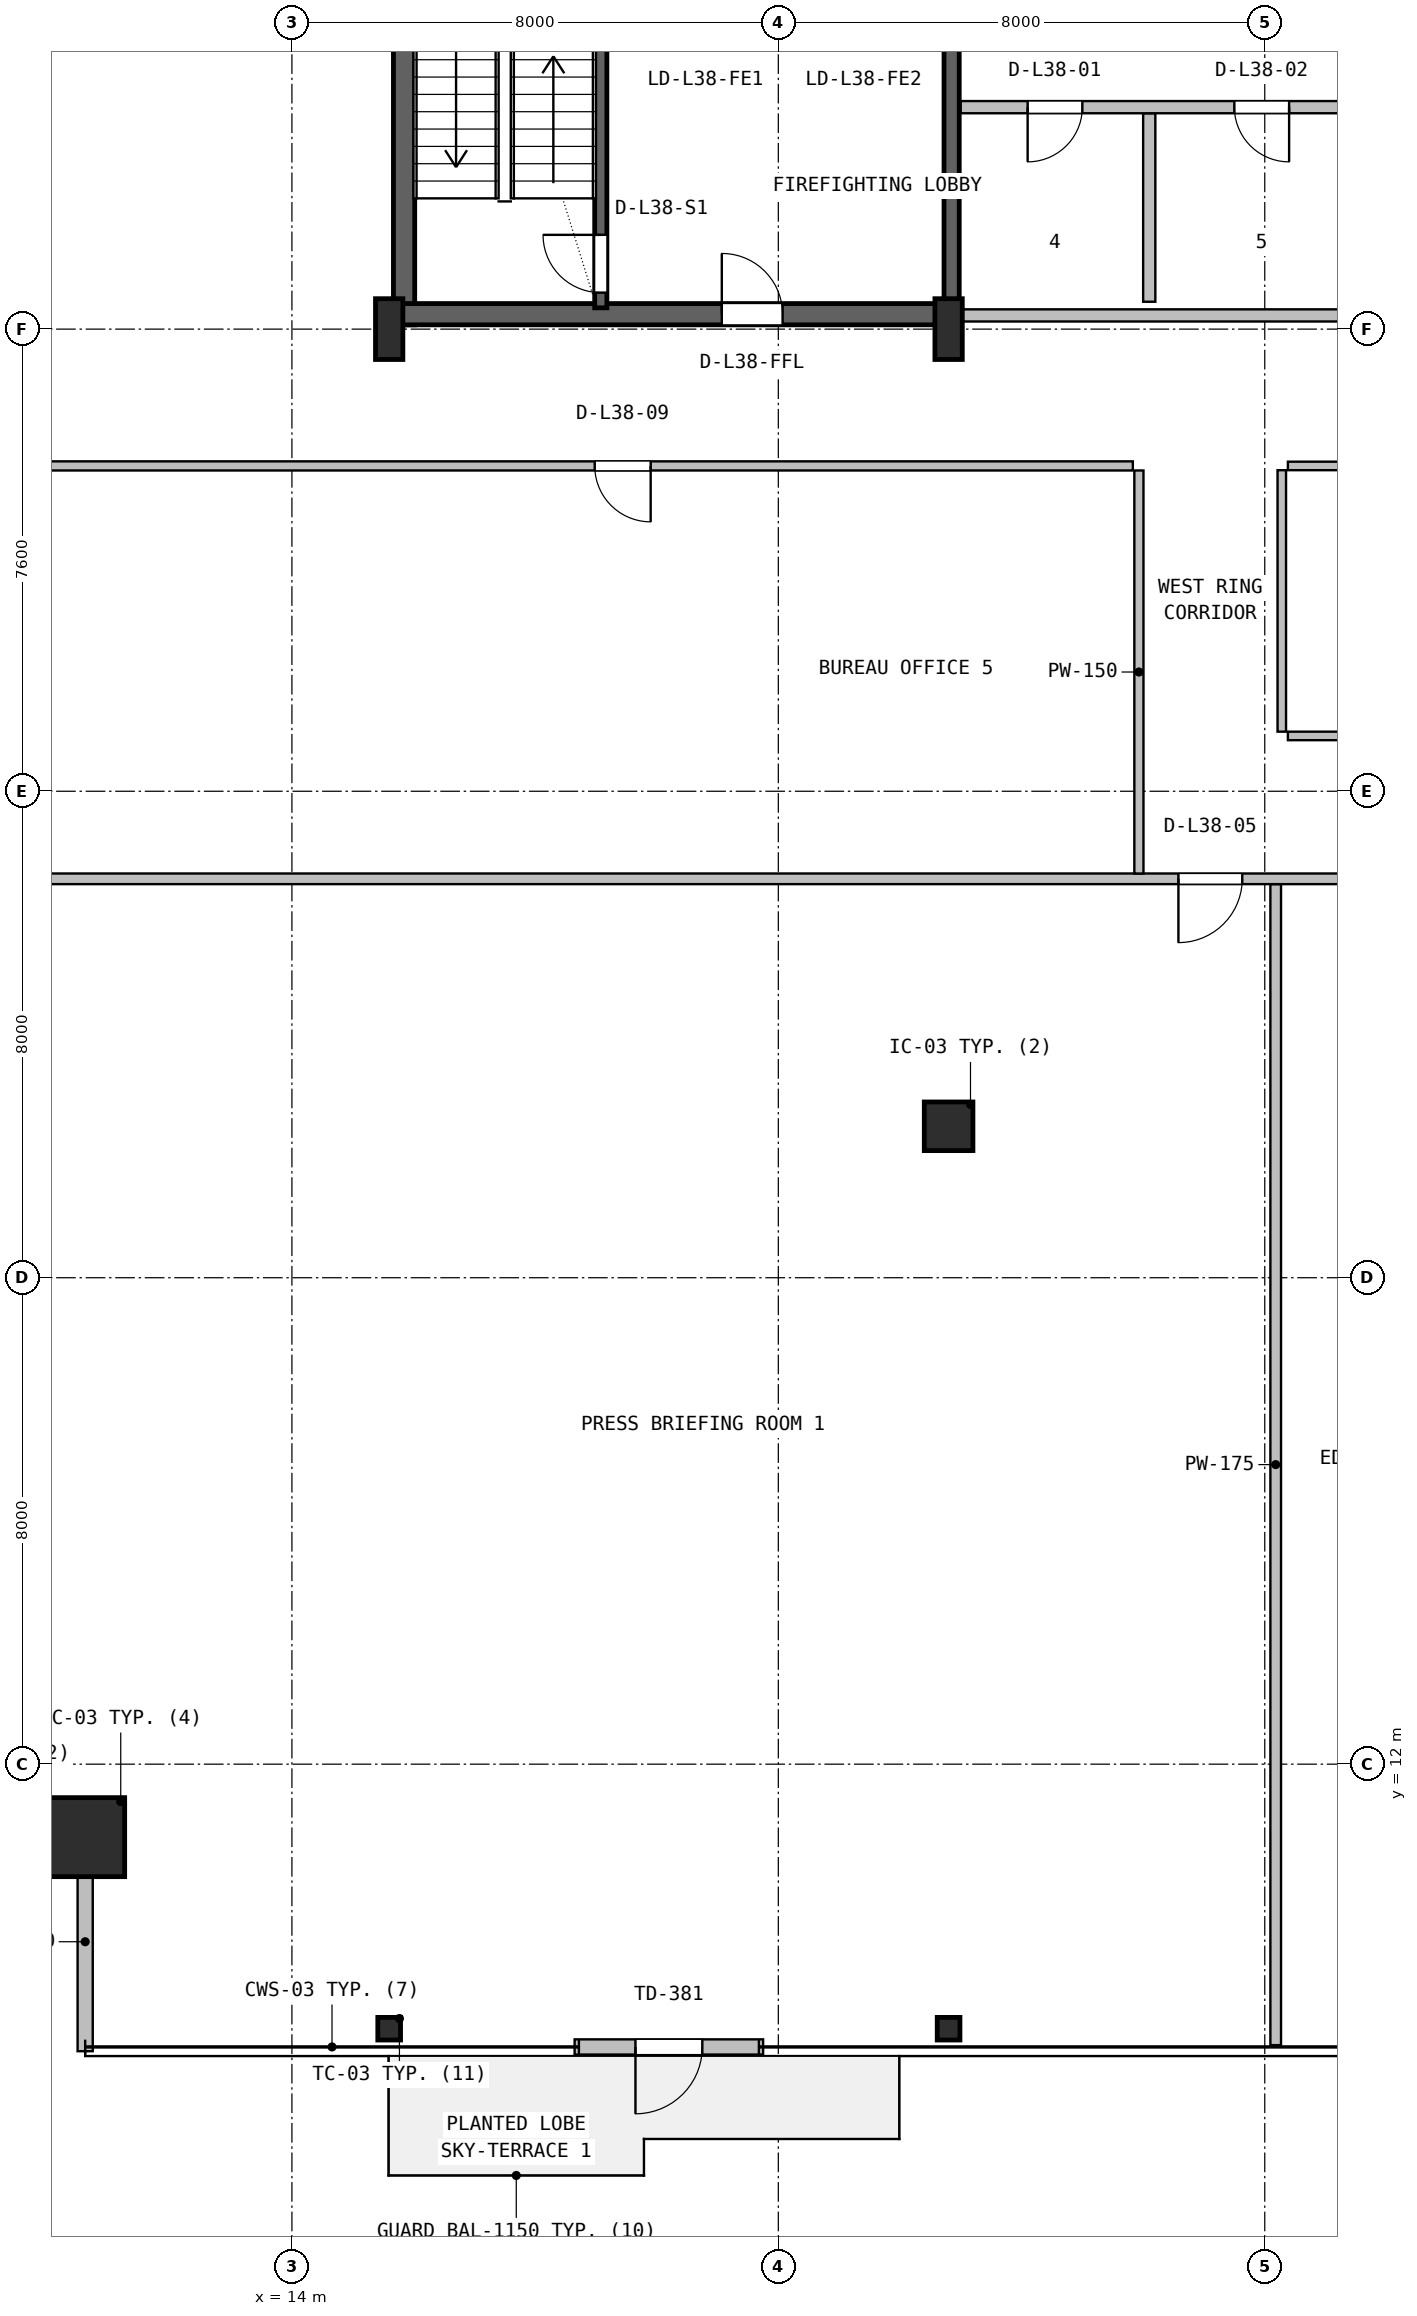
"""IFC4 building model, lengths in metres.
Left out: names, types, materials, properties, quantities, classifications, styles, units other than length and angle.
Written with IfcOpenShell. Run it as: python <this file> out.ifc"""

import sys

from ifc_helpers import new_model, si_unit, direction, frame, frame_2d, origin, origin_2d, place, context, subcontext, project, spatial, rectangle, hollow_rectangle, i_section, extrude, source, transform, mapped, element, fill, save


model = new_model("IFC4")
c1 = context("Model", 3, precision=1e-05, world=origin(), true_north=direction((0.0, 1.0)))
c2 = subcontext(c1, "Body", "Model", "MODEL_VIEW")
j1 = project(units=[si_unit("LENGTHUNIT", "METRE"), si_unit("PLANEANGLEUNIT", "RADIAN")], contexts=[c1])
p1 = place(None, origin())
s1 = spatial("IfcSite", under=j1, at=p1, CompositionType="ELEMENT")
p2 = place(p1, origin())
s2 = spatial("IfcBuilding", under=s1, at=p2, CompositionType="ELEMENT")
p3 = place(p2, frame((0.0, 0.0, 157.2)))
s3 = spatial("IfcBuildingStorey", under=s2, at=p3, CompositionType="ELEMENT", Elevation=157.2)
p4 = place(p3, frame((15.845, 35.67, 0.0), z_axis=(0.0, 0.0, 1.0), x_axis=(0.0, 1.0, 0.0)))
e1 = element("IfcWall", 1, at=p4, inside=s3, PredefinedType="SHEAR", context=c2, shape_type="SweptSolid", body=[
    extrude(rectangle(XDim=11.13, YDim=0.35, at=frame_2d((5.565, 0.0))), origin(), (0.0, 0.0, 1.0), 3.55),
])
p5 = place(p3, frame((15.67, 35.845, 0.0), z_axis=(0.0, 0.0, 1.0), x_axis=(1.0, 0.0, 0.0)))
e2 = element("IfcWall", 2, at=p5, inside=s3, PredefinedType="SHEAR", context=c2, shape_type="SweptSolid", body=[
    extrude(rectangle(XDim=9.13, YDim=0.35, at=frame_2d((4.565, 0.0))), origin(), (0.0, 0.0, 1.0), 3.55),
])
p6 = place(p5, frame((5.4, 0.0, 0.0)))
e3 = element("IfcOpeningElement", 3, at=p6, cuts=e2, PredefinedType="OPENING", context=c2, shape_type="SweptSolid", body=[
    extrude(rectangle(XDim=1.0, YDim=2.1, at=frame_2d((0.5, 1.05))), frame((0.0, 0.185, 0.0), z_axis=(0.0, -1.0, 0.0), x_axis=(1.0, 0.0, 0.0)), (0.0, 0.0, 1.0), 0.37),
])
m1 = source(origin(), c2, "Body", "SweptSolid", [
    extrude(i_section(OverallWidth=0.45, OverallDepth=1.0, WebThickness=0.016, FlangeThickness=0.03, FilletRadius=0.016, at=origin_2d()), origin(), (0.0, 0.0, 1.0), 3.8),
])
for number, where, z_axis, x_axis in (
    (4, (15.6, 35.6, 0.0), (0.0, 0.0, 1.0), (1.0, 0.0, 0.0)),
    (5, (24.8, 35.6, 0.0), (0.0, 0.0, 1.0), (1.0, 0.0, 0.0)),
):
    element("IfcColumn", number, at=place(p3, frame(where, z_axis=z_axis, x_axis=x_axis)), inside=s3, PredefinedType="COLUMN", context=c2, shape_type="MappedRepresentation", body=[
        mapped(m1, transform((0.0, 0.0, 0.0), x_axis=(1.0, 0.0, 0.0), y_axis=(0.0, 1.0, 0.0), z_axis=(0.0, 0.0, 1.0), scale=1.0)),
    ])
m2 = source(origin(), c2, "Body", "SweptSolid", [
    extrude(hollow_rectangle(XDim=1.3, YDim=1.3, WallThickness=0.05, at=origin_2d()), origin(), (0.0, 0.0, 1.0), 3.8),
])
p7 = place(p3, frame((10.6, 10.8, 0.0), z_axis=(0.0, 0.0, 1.0), x_axis=(1.0, 0.0, 0.0)))
e6 = element("IfcColumn", 6, at=p7, inside=s3, PredefinedType="COLUMN", context=c2, shape_type="MappedRepresentation", body=[
    mapped(m2, transform((0.0, 0.0, 0.0), x_axis=(1.0, 0.0, 0.0), y_axis=(0.0, 1.0, 0.0), z_axis=(0.0, 0.0, 1.0), scale=1.0)),
])
m3 = source(origin(), c2, "Body", "SweptSolid", [
    extrude(i_section(OverallWidth=0.374, OverallDepth=0.372, WebThickness=0.016, FlangeThickness=0.026, FilletRadius=0.016, at=origin_2d()), origin(), (0.0, 0.0, 1.0), 3.8),
])
for number, where, z_axis, x_axis in (
    (7, (15.6, 7.65, 0.0), (0.0, 0.0, 1.0), (1.0, 0.0, 0.0)),
    (8, (24.8, 7.65, 0.0), (0.0, 0.0, 1.0), (1.0, 0.0, 0.0)),
):
    element("IfcColumn", number, at=place(p3, frame(where, z_axis=z_axis, x_axis=x_axis)), inside=s3, PredefinedType="COLUMN", context=c2, shape_type="MappedRepresentation", body=[
        mapped(m3, transform((0.0, 0.0, 0.0), x_axis=(1.0, 0.0, 0.0), y_axis=(0.0, 1.0, 0.0), z_axis=(0.0, 0.0, 1.0), scale=1.0)),
    ])
m4 = source(origin(), c2, "Body", "SweptSolid", [
    extrude(rectangle(XDim=0.8, YDim=0.8, at=origin_2d()), origin(), (0.0, 0.0, 1.0), 3.8),
])
p8 = place(p3, frame((24.8, 22.49, 0.0), z_axis=(0.0, 0.0, 1.0), x_axis=(1.0, 0.0, 0.0)))
e9 = element("IfcColumn", 9, at=p8, inside=s3, PredefinedType="COLUMN", context=c2, shape_type="MappedRepresentation", body=[
    mapped(m4, transform((0.0, 0.0, 0.0), x_axis=(1.0, 0.0, 0.0), y_axis=(0.0, 1.0, 0.0), z_axis=(0.0, 0.0, 1.0), scale=1.0)),
])
p9 = place(p3, frame((18.65, 7.35, 0.0), z_axis=(0.0, 0.0, 1.0), x_axis=(1.0, 0.0, 0.0)))
e10 = element("IfcWall", 10, at=p9, inside=s3, PredefinedType="SOLIDWALL", context=c2, shape_type="SweptSolid", body=[
    extrude(rectangle(XDim=3.1, YDim=0.25, at=frame_2d((1.55, 0.0))), origin(), (0.0, 0.0, 1.0), 3.53),
])
p10 = place(p9, frame((1.0, 0.0, 0.0)))
e11 = element("IfcOpeningElement", 11, at=p10, cuts=e10, PredefinedType="OPENING", context=c2, shape_type="SweptSolid", body=[
    extrude(rectangle(XDim=1.1, YDim=2.15, at=frame_2d((0.55, 1.075))), frame((0.0, 0.135, 0.0), z_axis=(0.0, -1.0, 0.0), x_axis=(1.0, 0.0, 0.0)), (0.0, 0.0, 1.0), 0.27),
])
p11 = place(p3, frame((10.6, 7.28, 0.0), z_axis=(0.0, 0.0, 1.0), x_axis=(0.0, 1.0, 0.0)))
e12 = element("IfcWall", 12, at=p11, inside=s3, PredefinedType="SOLIDWALL", context=c2, shape_type="SweptSolid", body=[
    extrude(rectangle(XDim=3.6, YDim=0.25, at=frame_2d((1.8, 0.0))), origin(), (0.0, 0.0, 1.0), 3.108),
])
p12 = place(p3, frame((19.08, 35.95, 0.0), z_axis=(0.0, 0.0, 1.0), x_axis=(0.0, 1.0, 0.0)))
e13 = element("IfcWall", 13, at=p12, inside=s3, PredefinedType="SHEAR", context=c2, shape_type="SweptSolid", body=[
    extrude(rectangle(XDim=9.65, YDim=0.2, at=frame_2d((4.825, 0.0))), origin(), (0.0, 0.0, 1.0), 3.55),
])
p13 = place(p12, frame((0.25, 0.0, 0.0)))
e14 = element("IfcOpeningElement", 14, at=p13, cuts=e13, PredefinedType="OPENING", context=c2, shape_type="SweptSolid", body=[
    extrude(rectangle(XDim=0.95, YDim=2.1, at=frame_2d((0.475, 1.05))), frame((0.0, 0.11, 0.0), z_axis=(0.0, -1.0, 0.0), x_axis=(1.0, 0.0, 0.0)), (0.0, 0.0, 1.0), 0.22),
])
p14 = place(p3, frame((24.85, 36.05, 0.0), z_axis=(0.0, 0.0, 1.0), x_axis=(0.0, 1.0, 0.0)))
e15 = element("IfcWall", 15, at=p14, inside=s3, PredefinedType="SHEAR", context=c2, shape_type="SweptSolid", body=[
    extrude(rectangle(XDim=10.45, YDim=0.25, at=frame_2d((5.225, 0.0))), origin(), (0.0, 0.0, 1.0), 3.55),
])
p15 = place(p3, frame((25.0, 35.825, 0.0), z_axis=(0.0, 0.0, 1.0), x_axis=(1.0, 0.0, 0.0)))
e16 = element("IfcWall", 16, at=p15, inside=s3, PredefinedType="SOLIDWALL", context=c2, shape_type="SweptSolid", body=[
    extrude(rectangle(XDim=12.95, YDim=0.2, at=frame_2d((6.475, 0.0))), origin(), (0.0, 0.0, 1.0), 2.575),
])
p16 = place(p3, frame((28.1, 36.05, 0.0), z_axis=(0.0, 0.0, 1.0), x_axis=(0.0, 1.0, 0.0)))
e17 = element("IfcWall", 17, at=p16, inside=s3, PredefinedType="PLUMBINGWALL", context=c2, shape_type="SweptSolid", body=[
    extrude(rectangle(XDim=3.1, YDim=0.2, at=frame_2d((1.55, 0.0))), origin(), (0.0, 0.0, 1.0), 3.53),
])
p17 = place(p3, frame((25.0, 39.25, 0.0), z_axis=(0.0, 0.0, 1.0), x_axis=(1.0, 0.0, 0.0)))
e18 = element("IfcWall", 18, at=p17, inside=s3, PredefinedType="SOLIDWALL", context=c2, shape_type="SweptSolid", body=[
    extrude(rectangle(XDim=12.95, YDim=0.2, at=frame_2d((6.475, 0.0))), origin(), (0.0, 0.0, 1.0), 3.53),
])
p18 = place(p17, frame((1.1, 0.0, 0.0)))
e19 = element("IfcOpeningElement", 19, at=p18, cuts=e18, PredefinedType="OPENING", context=c2, shape_type="SweptSolid", body=[
    extrude(rectangle(XDim=0.9, YDim=2.06, at=frame_2d((0.45, 1.03))), frame((0.0, 0.11, 0.0), z_axis=(0.0, -1.0, 0.0), x_axis=(1.0, 0.0, 0.0)), (0.0, 0.0, 1.0), 0.22),
])
p19 = place(p17, frame((4.5, 0.0, 0.0)))
e20 = element("IfcOpeningElement", 20, at=p19, cuts=e18, PredefinedType="OPENING", context=c2, shape_type="SweptSolid", body=[
    extrude(rectangle(XDim=0.9, YDim=2.06, at=frame_2d((0.45, 1.03))), frame((0.0, 0.11, 0.0), z_axis=(0.0, -1.0, 0.0), x_axis=(1.0, 0.0, 0.0)), (0.0, 0.0, 1.0), 0.22),
])
p20 = place(p17, frame((7.84, 0.0, 0.0)))
e21 = element("IfcOpeningElement", 21, at=p20, cuts=e18, PredefinedType="OPENING", context=c2, shape_type="SweptSolid", body=[
    extrude(rectangle(XDim=0.92, YDim=2.08, at=frame_2d((0.46, 1.04))), frame((0.0, 0.11, 0.0), z_axis=(0.0, -1.0, 0.0), x_axis=(1.0, 0.0, 0.0)), (0.0, 0.0, 1.0), 0.22),
])
p21 = place(p17, frame((10.875, 0.0, 0.0)))
e22 = element("IfcOpeningElement", 22, at=p21, cuts=e18, PredefinedType="OPENING", context=c2, shape_type="SweptSolid", body=[
    extrude(rectangle(XDim=1.2, YDim=2.1, at=frame_2d((0.6, 1.05))), frame((0.0, 0.11, 0.0), z_axis=(0.0, -1.0, 0.0), x_axis=(1.0, 0.0, 0.0)), (0.0, 0.0, 1.0), 0.22),
])
p22 = place(p3, frame((30.18, 7.38, 0.0), z_axis=(0.0, 0.0, 1.0), x_axis=(0.0, 1.0, 0.0)))
e23 = element("IfcWall", 23, at=p22, inside=s3, PredefinedType="PARTITIONING", context=c2, shape_type="SweptSolid", body=[
    extrude(rectangle(XDim=19.093, YDim=0.175, at=frame_2d((9.546, 0.0))), origin(), (0.0, 0.0, 1.0), 2.909),
])
p23 = place(p3, frame((7.18, 26.56, 0.0), z_axis=(0.0, 0.0, 1.0), x_axis=(1.0, 0.0, 0.0)))
e24 = element("IfcWall", 24, at=p23, inside=s3, PredefinedType="PARTITIONING", context=c2, shape_type="SweptSolid", body=[
    extrude(rectangle(XDim=53.64, YDim=0.175, at=frame_2d((26.82, 0.0))), origin(), (0.0, 0.0, 1.0), 2.909),
])
p24 = place(p23, frame((21.4, 0.0, 0.0)))
e25 = element("IfcOpeningElement", 25, at=p24, cuts=e24, PredefinedType="OPENING", context=c2, shape_type="SweptSolid", body=[
    extrude(rectangle(XDim=1.05, YDim=2.1, at=frame_2d((0.525, 1.05))), frame((0.0, 0.098, 0.0), z_axis=(0.0, -1.0, 0.0), x_axis=(1.0, 0.0, 0.0)), (0.0, 0.0, 1.0), 0.195),
])
p25 = place(p23, frame((25.205, 0.0, 0.0)))
e26 = element("IfcOpeningElement", 26, at=p25, cuts=e24, PredefinedType="OPENING", context=c2, shape_type="SweptSolid", body=[
    extrude(rectangle(XDim=1.05, YDim=2.1, at=frame_2d((0.525, 1.05))), frame((0.0, 0.098, 0.0), z_axis=(0.0, -1.0, 0.0), x_axis=(1.0, 0.0, 0.0)), (0.0, 0.0, 1.0), 0.195),
])
p26 = place(p23, frame((29.825, 0.0, 0.0)))
e27 = element("IfcOpeningElement", 27, at=p26, cuts=e24, PredefinedType="OPENING", context=c2, shape_type="SweptSolid", body=[
    extrude(rectangle(XDim=1.4, YDim=2.12, at=frame_2d((0.7, 1.06))), frame((0.0, 0.098, 0.0), z_axis=(0.0, -1.0, 0.0), x_axis=(1.0, 0.0, 0.0)), (0.0, 0.0, 1.0), 0.195),
])
p27 = place(p23, frame((33.425, 0.0, 0.0)))
e28 = element("IfcOpeningElement", 28, at=p27, cuts=e24, PredefinedType="OPENING", context=c2, shape_type="SweptSolid", body=[
    extrude(rectangle(XDim=0.88, YDim=2.06, at=frame_2d((0.44, 1.03))), frame((0.0, 0.098, 0.0), z_axis=(0.0, -1.0, 0.0), x_axis=(1.0, 0.0, 0.0)), (0.0, 0.0, 1.0), 0.195),
])
p28 = place(p3, frame((27.93, 26.647, 0.0), z_axis=(0.0, 0.0, 1.0), x_axis=(0.0, 1.0, 0.0)))
e29 = element("IfcWall", 29, at=p28, inside=s3, PredefinedType="PARTITIONING", context=c2, shape_type="SweptSolid", body=[
    extrude(rectangle(XDim=6.628, YDim=0.15, at=frame_2d((3.314, 0.0))), origin(), (0.0, 0.0, 1.0), 3.222),
])
p29 = place(p3, frame((7.18, 33.35, 0.0), z_axis=(0.0, 0.0, 1.0), x_axis=(1.0, 0.0, 0.0)))
e30 = element("IfcWall", 30, at=p29, inside=s3, PredefinedType="PARTITIONING", context=c2, shape_type="SweptSolid", body=[
    extrude(rectangle(XDim=20.65, YDim=0.15, at=frame_2d((10.325, 0.0))), origin(), (0.0, 0.0, 1.0), 2.909),
])
p30 = place(p29, frame((11.8, 0.0, 0.0)))
e31 = element("IfcOpeningElement", 31, at=p30, cuts=e30, PredefinedType="OPENING", context=c2, shape_type="SweptSolid", body=[
    extrude(rectangle(XDim=0.92, YDim=2.08, at=frame_2d((0.46, 1.04))), frame((0.0, 0.085, 0.0), z_axis=(0.0, -1.0, 0.0), x_axis=(1.0, 0.0, 0.0)), (0.0, 0.0, 1.0), 0.17),
])
p31 = place(p3, frame((30.38, 28.91, 0.0), z_axis=(0.0, 0.0, 1.0), x_axis=(1.0, 0.0, 0.0)))
e32 = element("IfcWall", 32, at=p31, inside=s3, PredefinedType="PARTITIONING", context=c2, shape_type="SweptSolid", body=[
    extrude(rectangle(XDim=9.39, YDim=0.14, at=frame_2d((4.695, 0.0))), origin(), (0.0, 0.0, 1.0), 2.909),
])
p32 = place(p31, frame((2.03, 0.0, 0.0)))
e33 = element("IfcOpeningElement", 33, at=p32, cuts=e32, PredefinedType="OPENING", context=c2, shape_type="SweptSolid", body=[
    extrude(rectangle(XDim=1.0, YDim=2.1, at=frame_2d((0.5, 1.05))), frame((0.0, 0.08, 0.0), z_axis=(0.0, -1.0, 0.0), x_axis=(1.0, 0.0, 0.0)), (0.0, 0.0, 1.0), 0.16),
])
p33 = place(p3, frame((30.38, 33.35, 0.0), z_axis=(0.0, 0.0, 1.0), x_axis=(1.0, 0.0, 0.0)))
e34 = element("IfcWall", 34, at=p33, inside=s3, PredefinedType="PARTITIONING", context=c2, shape_type="SweptSolid", body=[
    extrude(rectangle(XDim=9.39, YDim=0.14, at=frame_2d((4.695, 0.0))), origin(), (0.0, 0.0, 1.0), 2.909),
])
p34 = place(p3, frame((30.28, 28.98, 0.0), z_axis=(0.0, 0.0, 1.0), x_axis=(0.0, 1.0, 0.0)))
e35 = element("IfcWall", 35, at=p34, inside=s3, PredefinedType="PARTITIONING", context=c2, shape_type="SweptSolid", body=[
    extrude(rectangle(XDim=4.3, YDim=0.14, at=frame_2d((2.15, 0.0))), origin(), (0.0, 0.0, 1.0), 3.222),
])
m5 = source(origin(), c2, "Body", "SweptSolid", [
    extrude(rectangle(XDim=1.1, YDim=2.15, at=frame_2d((0.55, 1.075))), frame((0.0, 0.025, 0.0), z_axis=(0.0, -1.0, 0.0), x_axis=(1.0, 0.0, 0.0)), (0.0, 0.0, 1.0), 0.05),
])
p35 = place(p10, frame((1.1, 0.0, 0.0), z_axis=(0.0, 0.0, 1.0), x_axis=(-1.0, 0.0, 0.0)))
e36 = element("IfcDoor", 36, at=p35, inside=s3, OperationType="SINGLE_SWING_LEFT", PredefinedType="DOOR", context=c2, shape_type="MappedRepresentation", body=[
    mapped(m5, transform((0.0, 0.0, 0.0), x_axis=(1.0, 0.0, 0.0), y_axis=(0.0, 1.0, 0.0), z_axis=(0.0, 0.0, 1.0), scale=1.0)),
])
fill(e11, e36)
m6 = source(origin(), c2, "Body", "SweptSolid", [
    extrude(rectangle(XDim=0.95, YDim=2.1, at=frame_2d((0.475, 1.05))), frame((0.0, 0.025, 0.0), z_axis=(0.0, -1.0, 0.0), x_axis=(1.0, 0.0, 0.0)), (0.0, 0.0, 1.0), 0.05),
])
p36 = place(p13, origin())
e37 = element("IfcDoor", 37, at=p36, inside=s3, OperationType="SINGLE_SWING_RIGHT", PredefinedType="DOOR", context=c2, shape_type="MappedRepresentation", body=[
    mapped(m6, transform((0.0, 0.0, 0.0), x_axis=(1.0, 0.0, 0.0), y_axis=(0.0, 1.0, 0.0), z_axis=(0.0, 0.0, 1.0), scale=1.0)),
])
fill(e14, e37)
m7 = source(origin(), c2, "Body", "SweptSolid", [
    extrude(rectangle(XDim=1.0, YDim=2.1, at=frame_2d((0.5, 1.05))), frame((0.0, 0.025, 0.0), z_axis=(0.0, -1.0, 0.0), x_axis=(1.0, 0.0, 0.0)), (0.0, 0.0, 1.0), 0.05),
])
p37 = place(p6, origin())
e38 = element("IfcDoor", 38, at=p37, inside=s3, OperationType="SINGLE_SWING_LEFT", PredefinedType="DOOR", context=c2, shape_type="MappedRepresentation", body=[
    mapped(m7, transform((0.0, 0.0, 0.0), x_axis=(1.0, 0.0, 0.0), y_axis=(0.0, 1.0, 0.0), z_axis=(0.0, 0.0, 1.0), scale=1.0)),
])
fill(e3, e38)
m8 = source(origin(), c2, "Body", "SweptSolid", [
    extrude(rectangle(XDim=0.9, YDim=2.06, at=frame_2d((0.45, 1.03))), frame((0.0, 0.025, 0.0), z_axis=(0.0, -1.0, 0.0), x_axis=(1.0, 0.0, 0.0)), (0.0, 0.0, 1.0), 0.05),
])
p38 = place(p18, frame((0.9, 0.0, 0.0), z_axis=(0.0, 0.0, 1.0), x_axis=(-1.0, 0.0, 0.0)))
e39 = element("IfcDoor", 39, at=p38, inside=s3, OperationType="SINGLE_SWING_LEFT", PredefinedType="DOOR", context=c2, shape_type="MappedRepresentation", body=[
    mapped(m8, transform((0.0, 0.0, 0.0), x_axis=(1.0, 0.0, 0.0), y_axis=(0.0, 1.0, 0.0), z_axis=(0.0, 0.0, 1.0), scale=1.0)),
])
fill(e19, e39)
p39 = place(p19, frame((0.9, 0.0, 0.0), z_axis=(0.0, 0.0, 1.0), x_axis=(-1.0, 0.0, 0.0)))
e40 = element("IfcDoor", 40, at=p39, inside=s3, OperationType="SINGLE_SWING_RIGHT", PredefinedType="DOOR", context=c2, shape_type="MappedRepresentation", body=[
    mapped(m8, transform((0.0, 0.0, 0.0), x_axis=(1.0, 0.0, 0.0), y_axis=(0.0, 1.0, 0.0), z_axis=(0.0, 0.0, 1.0), scale=1.0)),
])
fill(e20, e40)
m9 = source(origin(), c2, "Body", "SweptSolid", [
    extrude(rectangle(XDim=1.05, YDim=2.1, at=frame_2d((0.525, 1.05))), frame((0.0, 0.025, 0.0), z_axis=(0.0, -1.0, 0.0), x_axis=(1.0, 0.0, 0.0)), (0.0, 0.0, 1.0), 0.05),
])
p40 = place(p24, frame((1.05, 0.0, 0.0), z_axis=(0.0, 0.0, 1.0), x_axis=(-1.0, 0.0, 0.0)))
e41 = element("IfcDoor", 41, at=p40, inside=s3, OperationType="SINGLE_SWING_LEFT", PredefinedType="DOOR", context=c2, shape_type="MappedRepresentation", body=[
    mapped(m9, transform((0.0, 0.0, 0.0), x_axis=(1.0, 0.0, 0.0), y_axis=(0.0, 1.0, 0.0), z_axis=(0.0, 0.0, 1.0), scale=1.0)),
])
fill(e25, e41)
m10 = source(origin(), c2, "Body", "SweptSolid", [
    extrude(rectangle(XDim=0.92, YDim=2.08, at=frame_2d((0.46, 1.04))), frame((0.0, 0.025, 0.0), z_axis=(0.0, -1.0, 0.0), x_axis=(1.0, 0.0, 0.0)), (0.0, 0.0, 1.0), 0.05),
])
p41 = place(p30, frame((0.92, 0.0, 0.0), z_axis=(0.0, 0.0, 1.0), x_axis=(-1.0, 0.0, 0.0)))
e42 = element("IfcDoor", 42, at=p41, inside=s3, OperationType="SINGLE_SWING_RIGHT", PredefinedType="DOOR", context=c2, shape_type="MappedRepresentation", body=[
    mapped(m10, transform((0.0, 0.0, 0.0), x_axis=(1.0, 0.0, 0.0), y_axis=(0.0, 1.0, 0.0), z_axis=(0.0, 0.0, 1.0), scale=1.0)),
])
fill(e31, e42)
save(model, sys.argv[1])
